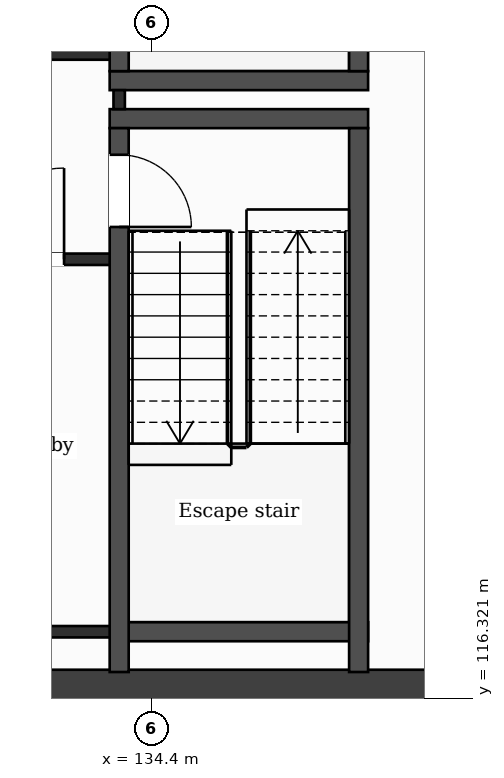
"""IFC4 building model, lengths in metres.
Left out: names, types, materials, properties, quantities, classifications, styles, units other than length and angle.
Written with IfcOpenShell. Run it as: python <this file> out.ifc"""

import sys

from ifc_helpers import new_model, si_unit, direction, frame, frame_2d, origin, place, context, subcontext, project, spatial, rectangle, extrude, element, fill, save


model = new_model("IFC4")
c1 = context("Model", 3, precision=1e-05, world=origin(), true_north=direction((0.0, 1.0)))
c2 = subcontext(c1, "Body", "Model", "MODEL_VIEW")
j1 = project(units=[si_unit("LENGTHUNIT", "METRE"), si_unit("PLANEANGLEUNIT", "RADIAN")], contexts=[c1])
p1 = place(None, origin())
s1 = spatial("IfcSite", under=j1, at=p1, CompositionType="ELEMENT")
p2 = place(p1, origin())
s2 = spatial("IfcBuilding", under=s1, at=p2, CompositionType="ELEMENT")
p3 = place(p2, frame((0.0, 0.0, 299.7)))
s3 = spatial("IfcBuildingStorey", under=s2, at=p3, CompositionType="ELEMENT", Elevation=299.7)
p4 = place(p3, frame((137.863, 132.05, 0.0), z_axis=(0.0, 0.0, 1.0), x_axis=(0.133401241494, -0.991062111458, 0.0)))
e1 = element("IfcWall", 1, at=p4, inside=s3, PredefinedType="SHEAR", context=c2, shape_type="SweptSolid", body=[
    extrude(rectangle(XDim=15.842, YDim=0.7, at=frame_2d((7.921, 0.0))), origin(), (0.0, 0.0, 1.0), 3.7),
])
p5 = place(p3, frame((139.977, 116.35, 0.0), z_axis=(0.0, 0.0, 1.0), x_axis=(-1.0, 0.0, 0.0)))
e2 = element("IfcWall", 2, at=p5, inside=s3, PredefinedType="SHEAR", context=c2, shape_type="SweptSolid", body=[
    extrude(rectangle(XDim=13.626, YDim=0.7, at=frame_2d((6.813, 0.0))), origin(), (0.0, 0.0, 1.0), 3.7),
])
p6 = place(p3, frame((131.573, 117.2, 0.0), z_axis=(0.0, 0.0, 1.0), x_axis=(1.0, 0.0, 0.0)))
e3 = element("IfcWall", 3, at=p6, inside=s3, PredefinedType="PARTITIONING", context=c2, shape_type="SweptSolid", body=[
    extrude(rectangle(XDim=2.4, YDim=0.15, at=frame_2d((1.2, 0.0))), origin(), (0.0, 0.0, 1.0), 3.25),
])
p7 = place(p3, frame((133.973, 117.2, 0.0), z_axis=(0.0, 0.0, 1.0), x_axis=(1.0, 0.0, 0.0)))
e4 = element("IfcWall", 4, at=p7, inside=s3, PredefinedType="PARTITIONING", context=c2, shape_type="SweptSolid", body=[
    extrude(rectangle(XDim=3.275, YDim=0.25, at=frame_2d((1.638, 0.0))), origin(), (0.0, 0.0, 1.0), 3.25),
])
p8 = place(p3, frame((131.573, 122.1, 0.0), z_axis=(0.0, 0.0, 1.0), x_axis=(1.0, 0.0, 0.0)))
e5 = element("IfcWall", 5, at=p8, inside=s3, PredefinedType="PARTITIONING", context=c2, shape_type="SweptSolid", body=[
    extrude(rectangle(XDim=2.4, YDim=0.15, at=frame_2d((1.2, 0.0))), origin(), (0.0, 0.0, 1.0), 3.25),
])
p9 = place(p8, frame((0.475, 0.0, 0.0)))
e6 = element("IfcOpeningElement", 6, at=p9, cuts=e5, PredefinedType="OPENING", context=c2, shape_type="SweptSolid", body=[
    extrude(rectangle(XDim=1.2, YDim=2.1, at=frame_2d((0.6, 1.05))), frame((0.0, 0.085, 0.0), z_axis=(0.0, -1.0, 0.0), x_axis=(1.0, 0.0, 0.0)), (0.0, 0.0, 1.0), 0.17),
])
for number, where, z_axis, x_axis in (
    (7, (133.848, 123.95, 0.0), (0.0, 0.0, 1.0), (1.0, 0.0, 0.0)),
    (8, (133.848, 124.45, 0.0), (0.0, 0.0, 1.0), (1.0, 0.0, 0.0)),
):
    element("IfcWall", number, at=place(p3, frame(where, z_axis=z_axis, x_axis=x_axis)), inside=s3, PredefinedType="PARTITIONING", context=c2, shape_type="SweptSolid", body=[
        extrude(rectangle(XDim=3.4, YDim=0.25, at=frame_2d((1.7, 0.0))), origin(), (0.0, 0.0, 1.0), 3.25),
    ])
p10 = place(p3, frame((131.549, 124.8, 0.0), z_axis=(0.0, 0.0, 1.0), x_axis=(1.0, 0.0, 0.0)))
e9 = element("IfcWall", 9, at=p10, inside=s3, PredefinedType="PARTITIONING", context=c2, shape_type="SweptSolid", body=[
    extrude(rectangle(XDim=2.549, YDim=0.15, at=frame_2d((1.275, 0.0))), origin(), (0.0, 0.0, 1.0), 3.25),
])
p11 = place(p3, frame((133.973, 124.075, 0.0), z_axis=(0.0, 0.0, 1.0), x_axis=(0.0, 1.0, 0.0)))
e10 = element("IfcWall", 10, at=p11, inside=s3, PredefinedType="PARTITIONING", context=c2, shape_type="SweptSolid", body=[
    extrude(rectangle(XDim=0.25, YDim=0.15, at=frame_2d((0.125, 0.0))), origin(), (0.0, 0.0, 1.0), 3.25),
])
p12 = place(p3, frame((133.973, 116.67, 0.0), z_axis=(0.0, 0.0, 1.0), x_axis=(0.0, 1.0, 0.0)))
e11 = element("IfcWall", 11, at=p12, inside=s3, PredefinedType="PARTITIONING", context=c2, shape_type="SweptSolid", body=[
    extrude(rectangle(XDim=7.155, YDim=0.25, at=frame_2d((3.578, 0.0))), origin(), (0.0, 0.0, 1.0), 3.25),
])
p13 = place(p12, frame((5.855, 0.0, 0.0)))
e12 = element("IfcOpeningElement", 12, at=p13, cuts=e11, PredefinedType="OPENING", context=c2, shape_type="SweptSolid", body=[
    extrude(rectangle(XDim=0.95, YDim=2.1, at=frame_2d((0.475, 1.05))), frame((0.0, 0.135, 0.0), z_axis=(0.0, -1.0, 0.0), x_axis=(1.0, 0.0, 0.0)), (0.0, 0.0, 1.0), 0.27),
])
p14 = place(p3, frame((133.973, 124.575, 0.0), z_axis=(0.0, 0.0, 1.0), x_axis=(0.0, 1.0, 0.0)))
e13 = element("IfcWall", 13, at=p14, inside=s3, PredefinedType="PARTITIONING", context=c2, shape_type="SweptSolid", body=[
    extrude(rectangle(XDim=7.155, YDim=0.25, at=frame_2d((3.578, 0.0))), origin(), (0.0, 0.0, 1.0), 3.25),
])
p15 = place(p14, frame((5.325, 0.0, 0.0)))
e14 = element("IfcOpeningElement", 14, at=p15, cuts=e13, PredefinedType="OPENING", context=c2, shape_type="SweptSolid", body=[
    extrude(rectangle(XDim=1.0, YDim=2.1, at=frame_2d((0.5, 1.05))), frame((0.0, 0.135, 0.0), z_axis=(0.0, -1.0, 0.0), x_axis=(1.0, 0.0, 0.0)), (0.0, 0.0, 1.0), 0.27),
])
for number, where, z_axis, x_axis in (
    (15, (137.123, 116.67, 0.0), (0.0, 0.0, 1.0), (0.0, 1.0, 0.0)),
    (16, (137.123, 124.575, 0.0), (0.0, 0.0, 1.0), (0.0, 1.0, 0.0)),
):
    element("IfcWall", number, at=place(p3, frame(where, z_axis=z_axis, x_axis=x_axis)), inside=s3, PredefinedType="PARTITIONING", context=c2, shape_type="SweptSolid", body=[
        extrude(rectangle(XDim=7.155, YDim=0.25, at=frame_2d((3.578, 0.0))), origin(), (0.0, 0.0, 1.0), 3.25),
    ])
p16 = place(p9, origin())
e17 = element("IfcDoor", 17, at=p16, inside=s3, OperationType="SINGLE_SWING_RIGHT", PredefinedType="DOOR", context=c2, shape_type="SweptSolid", body=[
    extrude(rectangle(XDim=1.2, YDim=2.1, at=frame_2d((0.6, 1.05))), frame((0.0, 0.025, 0.0), z_axis=(0.0, -1.0, 0.0), x_axis=(1.0, 0.0, 0.0)), (0.0, 0.0, 1.0), 0.05),
])
fill(e6, e17)
p17 = place(p13, origin())
e18 = element("IfcDoor", 18, at=p17, inside=s3, OperationType="SINGLE_SWING_LEFT", PredefinedType="DOOR", context=c2, shape_type="SweptSolid", body=[
    extrude(rectangle(XDim=0.95, YDim=2.1, at=frame_2d((0.475, 1.05))), frame((0.0, 0.025, 0.0), z_axis=(0.0, -1.0, 0.0), x_axis=(1.0, 0.0, 0.0)), (0.0, 0.0, 1.0), 0.05),
])
fill(e12, e18)
save(model, sys.argv[1])
